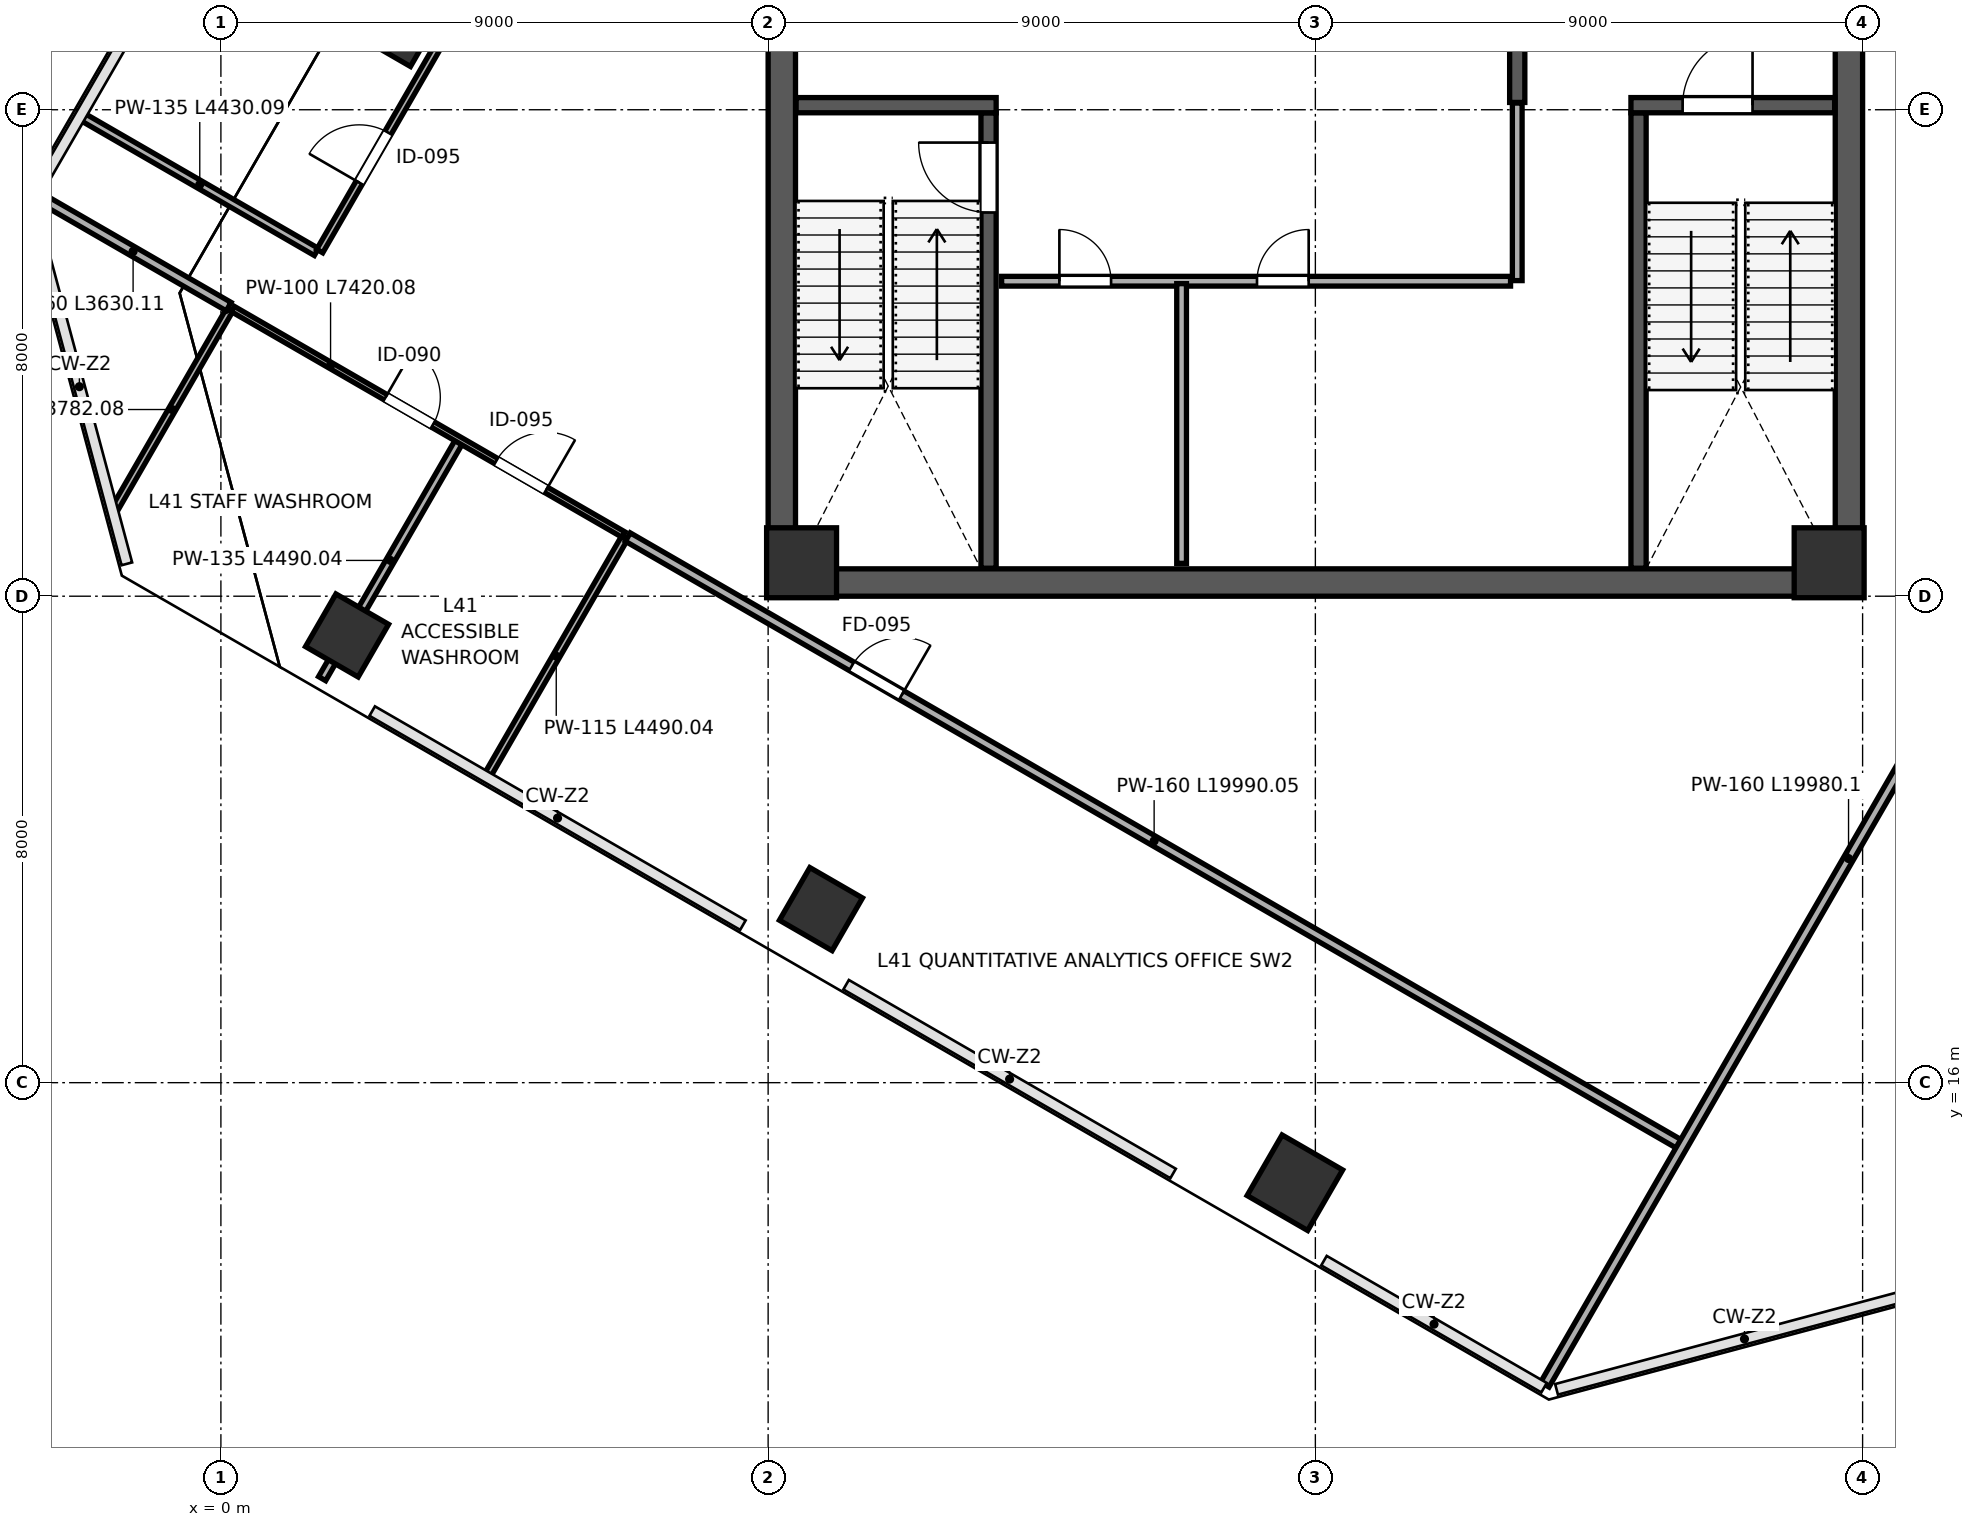
"""IFC4 building model, lengths in metres.
Left out: names, types, materials, properties, quantities, classifications, styles, units other than length and angle.
Written with IfcOpenShell. Run it as: python <this file> out.ifc"""

import sys

from ifc_helpers import new_model, si_unit, direction, frame, frame_2d, origin, origin_2d, place, context, subcontext, project, spatial, rectangle, extrude, clip, halfspace, source, transform, mapped, element, fill, save


model = new_model("IFC4")
c1 = context("Model", 3, precision=1e-05, world=origin(), true_north=direction((0.0, 1.0)))
c2 = subcontext(c1, "Body", "Model", "MODEL_VIEW")
j1 = project(units=[si_unit("LENGTHUNIT", "METRE"), si_unit("PLANEANGLEUNIT", "RADIAN")], contexts=[c1])
p1 = place(None, origin())
s1 = spatial("IfcSite", under=j1, at=p1, CompositionType="ELEMENT")
p2 = place(p1, origin())
s2 = spatial("IfcBuilding", under=s1, at=p2, CompositionType="ELEMENT")
p3 = place(p2, frame((0.0, 0.0, 183.4)))
s3 = spatial("IfcBuildingStorey", under=s2, at=p3, CompositionType="ELEMENT", Elevation=183.4)
m1 = source(origin(), c2, "Body", "SweptSolid", [
    extrude(rectangle(XDim=1.15, YDim=1.15, at=origin_2d()), origin(), (0.0, 0.0, 1.0), 4.199),
])
for number, where, z_axis, x_axis in (
    (1, (9.55, 24.55, 0.001), (0.0, 0.0, 1.0), (1.0, 0.0, 0.0)),
    (2, (26.45, 24.55, 0.001), (0.0, 0.0, 1.0), (1.0, 0.0, 0.0)),
):
    element("IfcColumn", number, at=place(p3, frame(where, z_axis=z_axis, x_axis=x_axis)), inside=s3, PredefinedType="COLUMN", context=c2, shape_type="MappedRepresentation", body=[
        mapped(m1, transform((0.0, 0.0, 0.0), scale=1.0)),
    ])
p4 = place(p3, frame((2.075, 23.354, 0.0), z_axis=(-0.083377991742, 0.19888120018, 0.976470367552), x_axis=(0.98744558757, -0.115433124648, 0.107825810097)))
e3 = element("IfcColumn", 3, at=p4, inside=s3, PredefinedType="COLUMN", context=c2, shape_type="Clipping", body=[
    clip(clip(extrude(rectangle(XDim=1.0, YDim=1.0, at=origin_2d()), origin(), (0.0, 0.0, 1.0), 4.302), halfspace(frame((0.0, 0.0, 0.152), z_axis=(0.0, 0.0, -1.0), x_axis=(1.0, 0.0, 0.0)), False)), halfspace(frame((0.0, 0.0, 4.15), z_axis=(0.0, 0.0, 1.0), x_axis=(1.0, 0.0, 0.0)), False)),
])
p5 = place(p3, frame((9.869, 18.854, 0.0), z_axis=(-0.131693763647, 0.121743822321, 0.98378615275), x_axis=(0.949075948953, 0.302015962665, 0.089672746218)))
e4 = element("IfcColumn", 4, at=p5, inside=s3, PredefinedType="COLUMN", context=c2, shape_type="Clipping", body=[
    clip(clip(extrude(rectangle(XDim=1.0, YDim=1.0, at=origin_2d()), origin(), (0.0, 0.0, 1.0), 4.27), halfspace(frame((0.0, 0.0, 0.125), z_axis=(0.0, 0.0, -1.0), x_axis=(1.0, 0.0, 0.0)), False)), halfspace(frame((0.0, 0.0, 4.144), z_axis=(0.0, 0.0, 1.0), x_axis=(1.0, 0.0, 0.0)), False)),
])
p6 = place(p3, frame((17.663, 14.354, 0.0), z_axis=(-0.179217090192, 0.043076087346, 0.982866056633), x_axis=(0.680215650395, 0.727195359087, 0.092160613493)))
e5 = element("IfcColumn", 5, at=p6, inside=s3, PredefinedType="COLUMN", context=c2, shape_type="Clipping", body=[
    clip(clip(extrude(rectangle(XDim=1.15, YDim=1.15, at=origin_2d()), origin(), (0.0, 0.0, 1.0), 4.273), halfspace(frame((0.0, 0.0, 0.148), z_axis=(0.0, 0.0, -1.0), x_axis=(1.0, 0.0, 0.0)), False)), halfspace(frame((0.0, 0.0, 4.125), z_axis=(0.0, 0.0, 1.0), x_axis=(1.0, 0.0, 0.0)), False)),
])
p7 = place(p3, frame((2.907, 33.497, 0.0), z_axis=(0.019402010534, 0.18922666744, 0.981741733002), x_axis=(0.811440649841, -0.576643979736, 0.095109370836)))
e6 = element("IfcColumn", 6, at=p7, inside=s3, PredefinedType="COLUMN", context=c2, shape_type="Clipping", body=[
    clip(clip(extrude(rectangle(XDim=1.15, YDim=1.15, at=origin_2d()), origin(), (0.0, 0.0, 1.0), 4.278), halfspace(frame((0.0, 0.0, 0.153), z_axis=(0.0, 0.0, -1.0), x_axis=(1.0, 0.0, 0.0)), False)), halfspace(frame((0.0, 0.0, 4.125), z_axis=(0.0, 0.0, 1.0), x_axis=(1.0, 0.0, 0.0)), False)),
])
p8 = place(p3, frame((9.225, 24.45, 0.0), z_axis=(0.0, 0.0, 1.0), x_axis=(0.0, 1.0, 0.0)))
e7 = element("IfcWall", 7, at=p8, inside=s3, PredefinedType="SHEAR", context=c2, shape_type="SweptSolid", body=[
    extrude(rectangle(XDim=15.1, YDim=0.45, at=frame_2d((7.55, 0.0))), origin(), (0.0, 0.0, 1.0), 3.96),
])
p9 = place(p3, frame((26.775, 24.45, 0.0), z_axis=(0.0, 0.0, 1.0), x_axis=(0.0, 1.0, 0.0)))
e8 = element("IfcWall", 8, at=p9, inside=s3, PredefinedType="SHEAR", context=c2, shape_type="SweptSolid", body=[
    extrude(rectangle(XDim=15.1, YDim=0.45, at=frame_2d((7.55, 0.0))), origin(), (0.0, 0.0, 1.0), 3.96),
])
p10 = place(p9, frame((8.6, 0.0, 0.0)))
e9 = element("IfcOpeningElement", 9, at=p10, cuts=e8, PredefinedType="OPENING", context=c2, shape_type="SweptSolid", body=[
    extrude(rectangle(XDim=1.15, YDim=2.2, at=frame_2d((0.575, 1.1))), frame((0.0, 0.235, 0.0), z_axis=(0.0, -1.0, 0.0), x_axis=(1.0, 0.0, 0.0)), (0.0, 0.0, 1.0), 0.47),
])
p11 = place(p3, frame((9.0, 24.225, 0.0), z_axis=(0.0, 0.0, 1.0), x_axis=(1.0, 0.0, 0.0)))
e10 = element("IfcWall", 10, at=p11, inside=s3, PredefinedType="SHEAR", context=c2, shape_type="SweptSolid", body=[
    extrude(rectangle(XDim=18.0, YDim=0.45, at=frame_2d((9.0, 0.0))), origin(), (0.0, 0.0, 1.0), 3.96),
])
p12 = place(p3, frame((12.625, 24.46, 0.0), z_axis=(0.0, 0.0, 1.0), x_axis=(0.0, 1.0, 0.0)))
e11 = element("IfcWall", 11, at=p12, inside=s3, PredefinedType="SHEAR", context=c2, shape_type="SweptSolid", body=[
    extrude(rectangle(XDim=7.49, YDim=0.25, at=frame_2d((3.745, 0.0))), origin(), (0.0, 0.0, 1.0), 3.96),
])
p13 = place(p12, frame((5.85, 0.0, 0.0)))
e12 = element("IfcOpeningElement", 12, at=p13, cuts=e11, PredefinedType="OPENING", context=c2, shape_type="SweptSolid", body=[
    extrude(rectangle(XDim=1.15, YDim=2.2, at=frame_2d((0.575, 1.1))), frame((0.0, 0.135, 0.0), z_axis=(0.0, -1.0, 0.0), x_axis=(1.0, 0.0, 0.0)), (0.0, 0.0, 1.0), 0.27),
])
p14 = place(p3, frame((9.46, 32.075, 0.0), z_axis=(0.0, 0.0, 1.0), x_axis=(1.0, 0.0, 0.0)))
e13 = element("IfcWall", 13, at=p14, inside=s3, PredefinedType="SHEAR", context=c2, shape_type="SweptSolid", body=[
    extrude(rectangle(XDim=3.29, YDim=0.25, at=frame_2d((1.645, 0.0))), origin(), (0.0, 0.0, 1.0), 3.96),
])
p15 = place(p3, frame((23.315, 24.46, 0.0), z_axis=(0.0, 0.0, 1.0), x_axis=(0.0, 1.0, 0.0)))
e14 = element("IfcWall", 14, at=p15, inside=s3, PredefinedType="SHEAR", context=c2, shape_type="SweptSolid", body=[
    extrude(rectangle(XDim=7.49, YDim=0.25, at=frame_2d((3.745, 0.0))), origin(), (0.0, 0.0, 1.0), 3.96),
])
p16 = place(p3, frame((23.19, 32.075, 0.0), z_axis=(0.0, 0.0, 1.0), x_axis=(1.0, 0.0, 0.0)))
e15 = element("IfcWall", 15, at=p16, inside=s3, PredefinedType="SHEAR", context=c2, shape_type="SweptSolid", body=[
    extrude(rectangle(XDim=3.35, YDim=0.25, at=frame_2d((1.675, 0.0))), origin(), (0.0, 0.0, 1.0), 3.96),
])
p17 = place(p16, frame((0.85, 0.0, 0.0)))
e16 = element("IfcOpeningElement", 16, at=p17, cuts=e15, PredefinedType="OPENING", context=c2, shape_type="SweptSolid", body=[
    extrude(rectangle(XDim=1.15, YDim=2.2, at=frame_2d((0.575, 1.1))), frame((0.0, 0.135, 0.0), z_axis=(0.0, -1.0, 0.0), x_axis=(1.0, 0.0, 0.0)), (0.0, 0.0, 1.0), 0.27),
])
p18 = place(p3, frame((21.32, 32.12, 0.0), z_axis=(0.0, 0.0, 1.0), x_axis=(0.0, 1.0, 0.0)))
e17 = element("IfcWall", 17, at=p18, inside=s3, PredefinedType="SHEAR", context=c2, shape_type="SweptSolid", body=[
    extrude(rectangle(XDim=7.42, YDim=0.25, at=frame_2d((3.71, 0.0))), origin(), (0.0, 0.0, 1.0), 3.96),
])
p19 = place(p18, frame((1.4, 0.0, 0.0)))
e18 = element("IfcOpeningElement", 18, at=p19, cuts=e17, PredefinedType="OPENING", context=c2, shape_type="SweptSolid", body=[
    extrude(rectangle(XDim=1.15, YDim=2.2, at=frame_2d((0.575, 1.1))), frame((0.0, 0.135, 0.0), z_axis=(0.0, -1.0, 0.0), x_axis=(1.0, 0.0, 0.0)), (0.0, 0.0, 1.0), 0.27),
])
p20 = place(p3, frame((12.84, 29.18, 0.0), z_axis=(0.0, 0.0, 1.0), x_axis=(1.0, 0.0, 0.0)))
e19 = element("IfcWall", 19, at=p20, inside=s3, PredefinedType="PARTITIONING", context=c2, shape_type="SweptSolid", body=[
    extrude(rectangle(XDim=8.37, YDim=0.16, at=frame_2d((4.185, 0.0))), origin(), (0.0, 0.0, 1.0), 3.96),
])
p21 = place(p20, frame((0.95, 0.0, 0.0)))
e20 = element("IfcOpeningElement", 20, at=p21, cuts=e19, PredefinedType="OPENING", context=c2, shape_type="SweptSolid", body=[
    extrude(rectangle(XDim=0.85, YDim=2.1, at=frame_2d((0.425, 1.05))), frame((0.0, 0.09, 0.0), z_axis=(0.0, -1.0, 0.0), x_axis=(1.0, 0.0, 0.0)), (0.0, 0.0, 1.0), 0.18),
])
p22 = place(p20, frame((4.2, 0.0, 0.0)))
e21 = element("IfcOpeningElement", 21, at=p22, cuts=e19, PredefinedType="OPENING", context=c2, shape_type="SweptSolid", body=[
    extrude(rectangle(XDim=0.85, YDim=2.1, at=frame_2d((0.425, 1.05))), frame((0.0, 0.09, 0.0), z_axis=(0.0, -1.0, 0.0), x_axis=(1.0, 0.0, 0.0)), (0.0, 0.0, 1.0), 0.18),
])
p23 = place(p3, frame((15.8, 24.54, 0.0), z_axis=(0.0, 0.0, 1.0), x_axis=(0.0, 1.0, 0.0)))
e22 = element("IfcWall", 22, at=p23, inside=s3, PredefinedType="PARTITIONING", context=c2, shape_type="SweptSolid", body=[
    extrude(rectangle(XDim=4.6, YDim=0.16, at=frame_2d((2.3, 0.0))), origin(), (0.0, 0.0, 1.0), 3.96),
])
p24 = place(p3, frame((21.32, 29.19, 0.0), z_axis=(0.0, 0.0, 1.0), x_axis=(0.0, 1.0, 0.0)))
e23 = element("IfcWall", 23, at=p24, inside=s3, PredefinedType="PARTITIONING", context=c2, shape_type="SweptSolid", body=[
    extrude(rectangle(XDim=2.92, YDim=0.16, at=frame_2d((1.46, 0.0))), origin(), (0.0, 0.0, 1.0), 3.96),
])
p25 = place(p3, frame((-1.749, 25.432, 0.0), z_axis=(0.0, 0.0, 1.0), x_axis=(0.500013012896, 0.866017890655, 0.0)))
e24 = element("IfcWall", 24, at=p25, inside=s3, PredefinedType="PARTITIONING", context=c2, shape_type="SweptSolid", body=[
    extrude(rectangle(XDim=3.782, YDim=0.115, at=frame_2d((1.891, 0.0))), origin(), (0.0, 0.0, 1.0), 3.96),
])
p26 = place(p3, frame((-3.016, 30.577, 0.0), z_axis=(0.0, 0.0, 1.0), x_axis=(0.866011990707, -0.500023231413, 0.0)))
e25 = element("IfcWall", 25, at=p26, inside=s3, PredefinedType="PARTITIONING", context=c2, shape_type="SweptSolid", body=[
    extrude(rectangle(XDim=3.63, YDim=0.16, at=frame_2d((1.815, 0.0))), origin(), (0.0, 0.0, 1.0), 3.96),
])
p27 = place(p3, frame((1.665, 22.644, 0.0), z_axis=(0.0, 0.0, 1.0), x_axis=(0.499981332661, 0.866036181109, 0.0)))
e26 = element("IfcWall", 26, at=p27, inside=s3, PredefinedType="PARTITIONING", context=c2, shape_type="SweptSolid", body=[
    extrude(rectangle(XDim=4.49, YDim=0.135, at=frame_2d((2.245, 0.0))), origin(), (0.0, 0.0, 1.0), 3.195),
])
p28 = place(p3, frame((4.393, 21.069, 0.0), z_axis=(0.0, 0.0, 1.0), x_axis=(0.499998569178, 0.866026229868, 0.0)))
e27 = element("IfcWall", 27, at=p28, inside=s3, PredefinedType="PARTITIONING", context=c2, shape_type="SweptSolid", body=[
    extrude(rectangle(XDim=4.49, YDim=0.115, at=frame_2d((2.245, 0.0))), origin(), (0.0, 0.0, 1.0), 3.195),
])
p29 = place(p3, frame((0.197, 28.722, 0.0), z_axis=(0.0, 0.0, 1.0), x_axis=(0.866017374541, -0.5000139068, 0.0)))
e28 = element("IfcWall", 28, at=p29, inside=s3, PredefinedType="PARTITIONING", context=c2, shape_type="SweptSolid", body=[
    extrude(rectangle(XDim=7.42, YDim=0.1, at=frame_2d((3.71, 0.0))), origin(), (0.0, 0.0, 1.0), 3.96),
])
p30 = place(p29, frame((2.9, 0.0, 0.0)))
e29 = element("IfcOpeningElement", 29, at=p30, cuts=e28, PredefinedType="OPENING", context=c2, shape_type="SweptSolid", body=[
    extrude(rectangle(XDim=0.9, YDim=2.15, at=frame_2d((0.45, 1.075))), frame((0.0, 0.06, 0.0), z_axis=(0.0, -1.0, 0.0), x_axis=(1.0, 0.0, 0.0)), (0.0, 0.0, 1.0), 0.12),
])
p31 = place(p29, frame((5.0, 0.0, 0.0)))
e30 = element("IfcOpeningElement", 30, at=p31, cuts=e28, PredefinedType="OPENING", context=c2, shape_type="SweptSolid", body=[
    extrude(rectangle(XDim=0.95, YDim=2.15, at=frame_2d((0.475, 1.075))), frame((0.0, 0.06, 0.0), z_axis=(0.0, -1.0, 0.0), x_axis=(1.0, 0.0, 0.0)), (0.0, 0.0, 1.0), 0.12),
])
p32 = place(p3, frame((6.692, 24.972, 0.0), z_axis=(0.0, 0.0, 1.0), x_axis=(0.866021861762, -0.500006134913, 0.0)))
e31 = element("IfcWall", 31, at=p32, inside=s3, PredefinedType="PARTITIONING", context=c2, shape_type="SweptSolid", body=[
    extrude(rectangle(XDim=19.99, YDim=0.16, at=frame_2d((9.995, 0.0))), origin(), (0.0, 0.0, 1.0), 3.96),
])
p33 = place(p32, frame((4.25, 0.0, 0.0)))
e32 = element("IfcOpeningElement", 32, at=p33, cuts=e31, PredefinedType="OPENING", context=c2, shape_type="SweptSolid", body=[
    extrude(rectangle(XDim=0.95, YDim=2.15, at=frame_2d((0.475, 1.075))), frame((0.0, 0.09, 0.0), z_axis=(0.0, -1.0, 0.0), x_axis=(1.0, 0.0, 0.0)), (0.0, 0.0, 1.0), 0.18),
])
p34 = place(p3, frame((-2.266, 31.876, 0.0), z_axis=(0.0, 0.0, 1.0), x_axis=(0.866026823135, -0.499997541604, 0.0)))
e33 = element("IfcWall", 33, at=p34, inside=s3, PredefinedType="PARTITIONING", context=c2, shape_type="SweptSolid", body=[
    extrude(rectangle(XDim=4.43, YDim=0.135, at=frame_2d((2.215, 0.0))), origin(), (0.0, 0.0, 1.0), 3.96),
])
p35 = place(p3, frame((1.625, 29.676, 0.0), z_axis=(0.0, 0.0, 1.0), x_axis=(0.500002707681, 0.866023840498, 0.0)))
e34 = element("IfcWall", 34, at=p35, inside=s3, PredefinedType="PARTITIONING", context=c2, shape_type="SweptSolid", body=[
    extrude(rectangle(XDim=23.1, YDim=0.115, at=frame_2d((11.55, 0.0))), origin(), (0.0, 0.0, 1.0), 3.96),
])
p36 = place(p35, frame((1.3, 0.0, 0.0)))
e35 = element("IfcOpeningElement", 35, at=p36, cuts=e34, PredefinedType="OPENING", context=c2, shape_type="SweptSolid", body=[
    extrude(rectangle(XDim=0.95, YDim=2.15, at=frame_2d((0.475, 1.075))), frame((0.0, 0.067, 0.0), z_axis=(0.0, -1.0, 0.0), x_axis=(1.0, 0.0, 0.0)), (0.0, 0.0, 1.0), 0.135),
])
p37 = place(p35, frame((14.6, 0.0, 0.0)))
e36 = element("IfcOpeningElement", 36, at=p37, cuts=e34, PredefinedType="OPENING", context=c2, shape_type="SweptSolid", body=[
    extrude(rectangle(XDim=0.95, YDim=2.15, at=frame_2d((0.475, 1.075))), frame((0.0, 0.067, 0.0), z_axis=(0.0, -1.0, 0.0), x_axis=(1.0, 0.0, 0.0)), (0.0, 0.0, 1.0), 0.135),
])
p38 = place(p3, frame((21.774, 11.034, 0.0), z_axis=(0.0, 0.0, 1.0), x_axis=(0.500008037328, 0.866020763381, 0.0)))
e37 = element("IfcWall", 37, at=p38, inside=s3, PredefinedType="PARTITIONING", context=c2, shape_type="SweptSolid", body=[
    extrude(rectangle(XDim=19.98, YDim=0.16, at=frame_2d((9.99, 0.0))), origin(), (0.0, 0.0, 1.0), 3.96),
])
m2 = source(origin(), c2, "Body", "SweptSolid", [
    extrude(rectangle(XDim=1.15, YDim=2.2, at=frame_2d((0.575, 1.1))), frame((0.0, 0.025, 0.0), z_axis=(0.0, -1.0, 0.0), x_axis=(1.0, 0.0, 0.0)), (0.0, 0.0, 1.0), 0.05),
])
p39 = place(p13, origin())
e38 = element("IfcDoor", 38, at=p39, inside=s3, OperationType="SINGLE_SWING_RIGHT", PredefinedType="DOOR", context=c2, shape_type="MappedRepresentation", body=[
    mapped(m2, transform((0.0, 0.0, 0.0), scale=1.0)),
])
fill(e12, e38)
p40 = place(p17, origin())
e39 = element("IfcDoor", 39, at=p40, inside=s3, OperationType="SINGLE_SWING_RIGHT", PredefinedType="DOOR", context=c2, shape_type="MappedRepresentation", body=[
    mapped(m2, transform((0.0, 0.0, 0.0), scale=1.0)),
])
fill(e16, e39)
m3 = source(origin(), c2, "Body", "SweptSolid", [
    extrude(rectangle(XDim=0.85, YDim=2.1, at=frame_2d((0.425, 1.05))), frame((0.0, 0.025, 0.0), z_axis=(0.0, -1.0, 0.0), x_axis=(1.0, 0.0, 0.0)), (0.0, 0.0, 1.0), 0.05),
])
p41 = place(p21, origin())
e40 = element("IfcDoor", 40, at=p41, inside=s3, OperationType="SINGLE_SWING_LEFT", PredefinedType="DOOR", context=c2, shape_type="MappedRepresentation", body=[
    mapped(m3, transform((0.0, 0.0, 0.0), scale=1.0)),
])
fill(e20, e40)
p42 = place(p22, origin())
e41 = element("IfcDoor", 41, at=p42, inside=s3, OperationType="SINGLE_SWING_RIGHT", PredefinedType="DOOR", context=c2, shape_type="MappedRepresentation", body=[
    mapped(m3, transform((0.0, 0.0, 0.0), scale=1.0)),
])
fill(e21, e41)
m4 = source(origin(), c2, "Body", "SweptSolid", [
    extrude(rectangle(XDim=0.9, YDim=2.15, at=frame_2d((0.45, 1.075))), frame((0.0, 0.025, 0.0), z_axis=(0.0, -1.0, 0.0), x_axis=(1.0, 0.0, 0.0)), (0.0, 0.0, 1.0), 0.05),
])
p43 = place(p30, origin())
e42 = element("IfcDoor", 42, at=p43, inside=s3, OperationType="SINGLE_SWING_LEFT", PredefinedType="DOOR", context=c2, shape_type="MappedRepresentation", body=[
    mapped(m4, transform((0.0, 0.0, 0.0), scale=1.0)),
])
fill(e29, e42)
m5 = source(origin(), c2, "Body", "SweptSolid", [
    extrude(rectangle(XDim=0.95, YDim=2.15, at=frame_2d((0.475, 1.075))), frame((0.0, 0.025, 0.0), z_axis=(0.0, -1.0, 0.0), x_axis=(1.0, 0.0, 0.0)), (0.0, 0.0, 1.0), 0.05),
])
p44 = place(p31, origin())
e43 = element("IfcDoor", 43, at=p44, inside=s3, OperationType="SINGLE_SWING_RIGHT", PredefinedType="DOOR", context=c2, shape_type="MappedRepresentation", body=[
    mapped(m5, transform((0.0, 0.0, 0.0), scale=1.0)),
])
fill(e30, e43)
m6 = source(origin(), c2, "Body", "SweptSolid", [
    extrude(rectangle(XDim=0.95, YDim=2.15, at=frame_2d((0.475, 1.075))), frame((0.0, 0.025, 0.0), z_axis=(0.0, -1.0, 0.0), x_axis=(1.0, 0.0, 0.0)), (0.0, 0.0, 1.0), 0.05),
])
p45 = place(p33, origin())
e44 = element("IfcDoor", 44, at=p45, inside=s3, OperationType="SINGLE_SWING_RIGHT", PredefinedType="DOOR", context=c2, shape_type="MappedRepresentation", body=[
    mapped(m6, transform((0.0, 0.0, 0.0), scale=1.0)),
])
fill(e32, e44)
p46 = place(p36, origin())
e45 = element("IfcDoor", 45, at=p46, inside=s3, OperationType="SINGLE_SWING_LEFT", PredefinedType="DOOR", context=c2, shape_type="MappedRepresentation", body=[
    mapped(m5, transform((0.0, 0.0, 0.0), scale=1.0)),
])
fill(e35, e45)
save(model, sys.argv[1])
